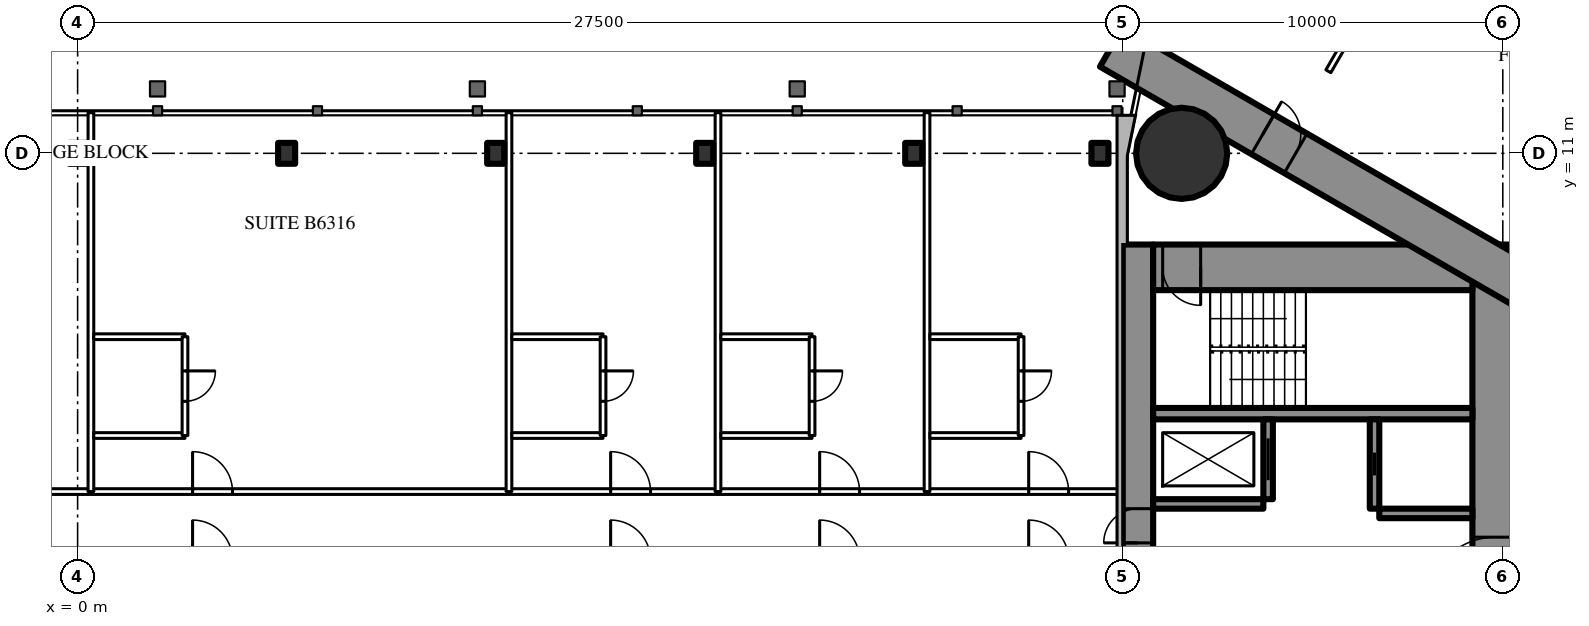
"""IFC4 building model, lengths in metres.
Left out: names, types, materials, properties, quantities, classifications, styles, units other than length and angle.
Written with IfcOpenShell. Run it as: python <this file> out.ifc"""

import sys

from ifc_helpers import new_model, si_unit, direction, frame, frame_2d, origin, origin_2d, place, context, subcontext, project, spatial, rectangle, circle, i_section, extrude, element, fill, save


model = new_model("IFC4")
c1 = context("Model", 3, precision=1e-05, world=origin(), true_north=direction((0.0, 1.0)))
c2 = subcontext(c1, "Body", "Model", "MODEL_VIEW")
j1 = project(units=[si_unit("LENGTHUNIT", "METRE"), si_unit("PLANEANGLEUNIT", "RADIAN")], contexts=[c1])
p1 = place(None, origin())
s1 = spatial("IfcSite", under=j1, at=p1, CompositionType="ELEMENT")
p2 = place(p1, origin())
s2 = spatial("IfcBuilding", under=s1, at=p2, CompositionType="ELEMENT")
p3 = place(p2, frame((0.0, 0.0, 236.9)))
s3 = spatial("IfcBuildingStorey", under=s2, at=p3, CompositionType="ELEMENT", Elevation=236.9)
p4 = place(p3, frame((29.05, 11.0, 0.0), z_axis=(0.0, 0.0, 1.0), x_axis=(1.0, 0.0, 0.0)))
e1 = element("IfcColumn", 1, at=p4, inside=s3, PredefinedType="COLUMN", context=c2, shape_type="SweptSolid", body=[
    extrude(circle(Radius=1.2, at=origin_2d()), origin(), (0.0, 0.0, 1.0), 3.6),
])
p5 = place(p3, frame((27.9, -8.6, 0.0), z_axis=(0.0, 0.0, 1.0), x_axis=(0.0, 1.0, 0.0)))
e2 = element("IfcWall", 2, at=p5, inside=s3, PredefinedType="SHEAR", context=c2, shape_type="SweptSolid", body=[
    extrude(rectangle(XDim=17.2, YDim=0.8, at=frame_2d((8.6, 0.0))), origin(), (0.0, 0.0, 1.0), 3.6),
])
p6 = place(p5, frame((9.35, 0.0, 0.0)))
e3 = element("IfcOpeningElement", 3, at=p6, cuts=e2, PredefinedType="OPENING", context=c2, shape_type="SweptSolid", body=[
    extrude(rectangle(XDim=0.9, YDim=2.2, at=frame_2d((0.45, 1.1))), frame((0.0, 0.41, 0.0), z_axis=(0.0, -1.0, 0.0), x_axis=(1.0, 0.0, 0.0)), (0.0, 0.0, 1.0), 0.82),
])
p7 = place(p3, frame((37.3, -8.6, 0.0), z_axis=(0.0, 0.0, 1.0), x_axis=(0.0, 1.0, 0.0)))
e4 = element("IfcWall", 4, at=p7, inside=s3, PredefinedType="SHEAR", context=c2, shape_type="SweptSolid", body=[
    extrude(rectangle(XDim=17.2, YDim=1.2, at=frame_2d((8.6, 0.0))), origin(), (0.0, 0.0, 1.0), 3.6),
])
p8 = place(p7, frame((7.7, 0.0, 0.0)))
e5 = element("IfcOpeningElement", 5, at=p8, cuts=e4, PredefinedType="OPENING", context=c2, shape_type="SweptSolid", body=[
    extrude(rectangle(XDim=1.8, YDim=2.2, at=frame_2d((0.9, 1.1))), frame((0.0, 0.61, 0.0), z_axis=(0.0, -1.0, 0.0), x_axis=(1.0, 0.0, 0.0)), (0.0, 0.0, 1.0), 1.22),
])
p9 = place(p3, frame((28.3, 8.0, 0.0), z_axis=(0.0, 0.0, 1.0), x_axis=(1.0, 0.0, 0.0)))
e6 = element("IfcWall", 6, at=p9, inside=s3, PredefinedType="SHEAR", context=c2, shape_type="SweptSolid", body=[
    extrude(rectangle(XDim=8.4, YDim=1.2, at=frame_2d((4.2, 0.0))), origin(), (0.0, 0.0, 1.0), 3.6),
])
p10 = place(p9, frame((0.25, 0.0, 0.0)))
e7 = element("IfcOpeningElement", 7, at=p10, cuts=e6, PredefinedType="OPENING", context=c2, shape_type="SweptSolid", body=[
    extrude(rectangle(XDim=1.0, YDim=2.2, at=frame_2d((0.5, 1.1))), frame((0.0, 0.61, 0.0), z_axis=(0.0, -1.0, 0.0), x_axis=(1.0, 0.0, 0.0)), (0.0, 0.0, 1.0), 1.22),
])
p11 = place(p3, frame((28.3, 4.15, 0.0), z_axis=(0.0, 0.0, 1.0), x_axis=(1.0, 0.0, 0.0)))
e8 = element("IfcWall", 8, at=p11, inside=s3, PredefinedType="SHEAR", context=c2, shape_type="SweptSolid", body=[
    extrude(rectangle(XDim=8.4, YDim=0.3, at=frame_2d((4.2, 0.0))), origin(), (0.0, 0.0, 1.0), 3.6),
])
p12 = place(p3, frame((31.325, 1.9, 0.0), z_axis=(0.0, 0.0, 1.0), x_axis=(0.0, 1.0, 0.0)))
e9 = element("IfcWall", 9, at=p12, inside=s3, PredefinedType="SHEAR", context=c2, shape_type="SweptSolid", body=[
    extrude(rectangle(XDim=2.1, YDim=0.25, at=frame_2d((1.05, 0.0))), origin(), (0.0, 0.0, 1.0), 3.6),
])
p13 = place(p12, frame((0.5, 0.0, 0.0)))
e10 = element("IfcOpeningElement", 10, at=p13, cuts=e9, PredefinedType="OPENING", context=c2, shape_type="SweptSolid", body=[
    extrude(rectangle(XDim=1.1, YDim=2.2, at=frame_2d((0.55, 1.1))), frame((0.0, 0.135, 0.0), z_axis=(0.0, -1.0, 0.0), x_axis=(1.0, 0.0, 0.0)), (0.0, 0.0, 1.0), 0.27),
])
p14 = place(p3, frame((34.125, 1.65, 0.0), z_axis=(0.0, 0.0, 1.0), x_axis=(0.0, 1.0, 0.0)))
e11 = element("IfcWall", 11, at=p14, inside=s3, PredefinedType="SHEAR", context=c2, shape_type="SweptSolid", body=[
    extrude(rectangle(XDim=2.35, YDim=0.25, at=frame_2d((1.175, 0.0))), origin(), (0.0, 0.0, 1.0), 3.6),
])
p15 = place(p14, frame((0.875, 0.0, 0.0)))
e12 = element("IfcOpeningElement", 12, at=p15, cuts=e11, PredefinedType="OPENING", context=c2, shape_type="SweptSolid", body=[
    extrude(rectangle(XDim=0.6, YDim=2.0, at=frame_2d((0.3, 1.0))), frame((0.0, 0.135, 0.0), z_axis=(0.0, -1.0, 0.0), x_axis=(1.0, 0.0, 0.0)), (0.0, 0.0, 1.0), 0.27),
])
p16 = place(p3, frame((28.3, 1.775, 0.0), z_axis=(0.0, 0.0, 1.0), x_axis=(1.0, 0.0, 0.0)))
e13 = element("IfcWall", 13, at=p16, inside=s3, PredefinedType="SHEAR", context=c2, shape_type="SweptSolid", body=[
    extrude(rectangle(XDim=2.9, YDim=0.25, at=frame_2d((1.45, 0.0))), origin(), (0.0, 0.0, 1.0), 3.6),
])
p17 = place(p3, frame((34.25, 1.525, 0.0), z_axis=(0.0, 0.0, 1.0), x_axis=(1.0, 0.0, 0.0)))
e14 = element("IfcWall", 14, at=p17, inside=s3, PredefinedType="SHEAR", context=c2, shape_type="SweptSolid", body=[
    extrude(rectangle(XDim=2.45, YDim=0.25, at=frame_2d((1.225, 0.0))), origin(), (0.0, 0.0, 1.0), 3.6),
])
p18 = place(p3, frame((27.2, -13.8, 0.0), z_axis=(0.0, 0.0, 1.0), x_axis=(0.866027159892, 0.499996958321, 0.0)))
e15 = element("IfcWall", 15, at=p18, inside=s3, PredefinedType="SHEAR", context=c2, shape_type="SweptSolid", body=[
    extrude(rectangle(XDim=27.947, YDim=1.2, at=frame_2d((13.973, 0.0))), origin(), (0.0, 0.0, 1.0), 3.6),
])
p19 = place(p18, frame((4.6, 0.0, 0.0)))
e16 = element("IfcOpeningElement", 16, at=p19, cuts=e15, PredefinedType="OPENING", context=c2, shape_type="SweptSolid", body=[
    extrude(rectangle(XDim=1.0, YDim=2.2, at=frame_2d((0.5, 1.1))), frame((0.0, 0.61, 0.0), z_axis=(0.0, -1.0, 0.0), x_axis=(1.0, 0.0, 0.0)), (0.0, 0.0, 1.0), 1.22),
])
p20 = place(p18, frame((13.395, 0.0, 0.0)))
e17 = element("IfcOpeningElement", 17, at=p20, cuts=e15, PredefinedType="OPENING", context=c2, shape_type="SweptSolid", body=[
    extrude(rectangle(XDim=1.8, YDim=2.2, at=frame_2d((0.9, 1.1))), frame((0.0, 0.61, 0.0), z_axis=(0.0, -1.0, 0.0), x_axis=(1.0, 0.0, 0.0)), (0.0, 0.0, 1.0), 1.22),
])
p21 = place(p3, frame((27.2, 13.8, 0.0), z_axis=(0.0, 0.0, 1.0), x_axis=(0.866024515034, -0.500001539357, 0.0)))
e18 = element("IfcWall", 18, at=p21, inside=s3, PredefinedType="SHEAR", context=c2, shape_type="SweptSolid", body=[
    extrude(rectangle(XDim=26.907, YDim=1.2, at=frame_2d((13.454, 0.0))), origin(), (0.0, 0.0, 1.0), 3.6),
])
p22 = place(p21, frame((4.6, 0.0, 0.0)))
e19 = element("IfcOpeningElement", 19, at=p22, cuts=e18, PredefinedType="OPENING", context=c2, shape_type="SweptSolid", body=[
    extrude(rectangle(XDim=1.0, YDim=2.2, at=frame_2d((0.5, 1.1))), frame((0.0, 0.61, 0.0), z_axis=(0.0, -1.0, 0.0), x_axis=(1.0, 0.0, 0.0)), (0.0, 0.0, 1.0), 1.22),
])
p23 = place(p21, frame((13.395, 0.0, 0.0)))
e20 = element("IfcOpeningElement", 20, at=p23, cuts=e18, PredefinedType="OPENING", context=c2, shape_type="SweptSolid", body=[
    extrude(rectangle(XDim=1.8, YDim=2.2, at=frame_2d((0.9, 1.1))), frame((0.0, 0.61, 0.0), z_axis=(0.0, -1.0, 0.0), x_axis=(1.0, 0.0, 0.0)), (0.0, 0.0, 1.0), 1.22),
])
for number, where, z_axis, x_axis in (
    (21, (0.0, 11.0, 0.0), (0.0, 0.0, 1.0), (1.0, 0.0, 0.0)),
    (22, (5.5, 11.0, 0.0), (0.0, 0.0, 1.0), (1.0, 0.0, 0.0)),
    (23, (11.0, 11.0, 0.0), (0.0, 0.0, 1.0), (1.0, 0.0, 0.0)),
    (24, (16.5, 11.0, 0.0), (0.0, 0.0, 1.0), (1.0, 0.0, 0.0)),
    (25, (22.0, 11.0, 0.0), (0.0, 0.0, 1.0), (1.0, 0.0, 0.0)),
    (26, (26.9, 11.0, 0.0), (0.0, 0.0, 1.0), (1.0, 0.0, 0.0)),
):
    element("IfcColumn", number, at=place(p3, frame(where, z_axis=z_axis, x_axis=x_axis)), inside=s3, PredefinedType="COLUMN", context=c2, shape_type="SweptSolid", body=[
        extrude(i_section(OverallWidth=0.448, OverallDepth=0.55, WebThickness=0.072, FlangeThickness=0.115, FilletRadius=0.02, at=origin_2d()), origin(), (0.0, 0.0, 1.0), 3.6),
    ])
p24 = place(p3, frame((32.91, 13.159, 0.0), z_axis=(0.0, 0.0, 1.0), x_axis=(0.500014963534, 0.866016764412, 0.0)))
e27 = element("IfcWall", 27, at=p24, inside=s3, PredefinedType="PARTITIONING", context=c2, shape_type="SweptSolid", body=[
    extrude(rectangle(XDim=7.682, YDim=0.15, at=frame_2d((3.841, 0.0))), origin(), (0.0, 0.0, 1.0), 3.35),
])
p25 = place(p3, frame((-10.65, 2.1, 0.0), z_axis=(0.0, 0.0, 1.0), x_axis=(1.0, 0.0, 0.0)))
e28 = element("IfcWall", 28, at=p25, inside=s3, PredefinedType="PARTITIONING", context=c2, shape_type="SweptSolid", body=[
    extrude(rectangle(XDim=38.15, YDim=0.15, at=frame_2d((19.075, 0.0))), origin(), (0.0, 0.0, 1.0), 3.4),
])
p26 = place(p25, frame((2.675, 0.0, 0.0)))
e29 = element("IfcOpeningElement", 29, at=p26, cuts=e28, PredefinedType="OPENING", context=c2, shape_type="SweptSolid", body=[
    extrude(rectangle(XDim=1.05, YDim=2.4, at=frame_2d((0.525, 1.2))), frame((0.0, 0.085, 0.0), z_axis=(0.0, -1.0, 0.0), x_axis=(1.0, 0.0, 0.0)), (0.0, 0.0, 1.0), 0.17),
])
p27 = place(p25, frame((13.675, 0.0, 0.0)))
e30 = element("IfcOpeningElement", 30, at=p27, cuts=e28, PredefinedType="OPENING", context=c2, shape_type="SweptSolid", body=[
    extrude(rectangle(XDim=1.05, YDim=2.4, at=frame_2d((0.525, 1.2))), frame((0.0, 0.085, 0.0), z_axis=(0.0, -1.0, 0.0), x_axis=(1.0, 0.0, 0.0)), (0.0, 0.0, 1.0), 0.17),
])
p28 = place(p25, frame((24.675, 0.0, 0.0)))
e31 = element("IfcOpeningElement", 31, at=p28, cuts=e28, PredefinedType="OPENING", context=c2, shape_type="SweptSolid", body=[
    extrude(rectangle(XDim=1.05, YDim=2.4, at=frame_2d((0.525, 1.2))), frame((0.0, 0.085, 0.0), z_axis=(0.0, -1.0, 0.0), x_axis=(1.0, 0.0, 0.0)), (0.0, 0.0, 1.0), 0.17),
])
p29 = place(p25, frame((30.175, 0.0, 0.0)))
e32 = element("IfcOpeningElement", 32, at=p29, cuts=e28, PredefinedType="OPENING", context=c2, shape_type="SweptSolid", body=[
    extrude(rectangle(XDim=1.05, YDim=2.4, at=frame_2d((0.525, 1.2))), frame((0.0, 0.085, 0.0), z_axis=(0.0, -1.0, 0.0), x_axis=(1.0, 0.0, 0.0)), (0.0, 0.0, 1.0), 0.17),
])
p30 = place(p25, frame((35.675, 0.0, 0.0)))
e33 = element("IfcOpeningElement", 33, at=p30, cuts=e28, PredefinedType="OPENING", context=c2, shape_type="SweptSolid", body=[
    extrude(rectangle(XDim=1.05, YDim=2.4, at=frame_2d((0.525, 1.2))), frame((0.0, 0.085, 0.0), z_axis=(0.0, -1.0, 0.0), x_axis=(1.0, 0.0, 0.0)), (0.0, 0.0, 1.0), 0.17),
])
for number, where, z_axis, x_axis in (
    (34, (0.35, 2.1, 0.0), (0.0, 0.0, 1.0), (0.0, 1.0, 0.0)),
    (35, (11.35, 2.1, 0.0), (0.0, 0.0, 1.0), (0.0, 1.0, 0.0)),
    (36, (16.85, 2.1, 0.0), (0.0, 0.0, 1.0), (0.0, 1.0, 0.0)),
    (37, (22.35, 2.1, 0.0), (0.0, 0.0, 1.0), (0.0, 1.0, 0.0)),
):
    element("IfcWall", number, at=place(p3, frame(where, z_axis=z_axis, x_axis=x_axis)), inside=s3, PredefinedType="PARTITIONING", context=c2, shape_type="SweptSolid", body=[
        extrude(rectangle(XDim=9.97, YDim=0.15, at=frame_2d((4.985, 0.0))), origin(), (0.0, 0.0, 1.0), 3.4),
    ])
for number, where, z_axis, x_axis in (
    (38, (0.425, 6.175, 0.0), (0.0, 0.0, 1.0), (1.0, 0.0, 0.0)),
    (39, (0.425, 3.575, 0.0), (0.0, 0.0, 1.0), (1.0, 0.0, 0.0)),
):
    element("IfcWall", number, at=place(p3, frame(where, z_axis=z_axis, x_axis=x_axis)), inside=s3, PredefinedType="PARTITIONING", context=c2, shape_type="SweptSolid", body=[
        extrude(rectangle(XDim=2.4, YDim=0.15, at=frame_2d((1.2, 0.0))), origin(), (0.0, 0.0, 1.0), 3.4),
    ])
p31 = place(p3, frame((2.825, 3.575, 0.0), z_axis=(0.0, 0.0, 1.0), x_axis=(0.0, 1.0, 0.0)))
e40 = element("IfcWall", 40, at=p31, inside=s3, PredefinedType="PARTITIONING", context=c2, shape_type="SweptSolid", body=[
    extrude(rectangle(XDim=2.6, YDim=0.15, at=frame_2d((1.3, 0.0))), origin(), (0.0, 0.0, 1.0), 3.4),
])
p32 = place(p31, frame((0.9, 0.0, 0.0)))
e41 = element("IfcOpeningElement", 41, at=p32, cuts=e40, PredefinedType="OPENING", context=c2, shape_type="SweptSolid", body=[
    extrude(rectangle(XDim=0.8, YDim=2.2, at=frame_2d((0.4, 1.1))), frame((0.0, 0.085, 0.0), z_axis=(0.0, -1.0, 0.0), x_axis=(1.0, 0.0, 0.0)), (0.0, 0.0, 1.0), 0.17),
])
for number, where, z_axis, x_axis in (
    (42, (11.425, 6.175, 0.0), (0.0, 0.0, 1.0), (1.0, 0.0, 0.0)),
    (43, (11.425, 3.575, 0.0), (0.0, 0.0, 1.0), (1.0, 0.0, 0.0)),
):
    element("IfcWall", number, at=place(p3, frame(where, z_axis=z_axis, x_axis=x_axis)), inside=s3, PredefinedType="PARTITIONING", context=c2, shape_type="SweptSolid", body=[
        extrude(rectangle(XDim=2.4, YDim=0.15, at=frame_2d((1.2, 0.0))), origin(), (0.0, 0.0, 1.0), 3.4),
    ])
p33 = place(p3, frame((13.825, 3.575, 0.0), z_axis=(0.0, 0.0, 1.0), x_axis=(0.0, 1.0, 0.0)))
e44 = element("IfcWall", 44, at=p33, inside=s3, PredefinedType="PARTITIONING", context=c2, shape_type="SweptSolid", body=[
    extrude(rectangle(XDim=2.6, YDim=0.15, at=frame_2d((1.3, 0.0))), origin(), (0.0, 0.0, 1.0), 3.4),
])
p34 = place(p33, frame((0.9, 0.0, 0.0)))
e45 = element("IfcOpeningElement", 45, at=p34, cuts=e44, PredefinedType="OPENING", context=c2, shape_type="SweptSolid", body=[
    extrude(rectangle(XDim=0.8, YDim=2.2, at=frame_2d((0.4, 1.1))), frame((0.0, 0.085, 0.0), z_axis=(0.0, -1.0, 0.0), x_axis=(1.0, 0.0, 0.0)), (0.0, 0.0, 1.0), 0.17),
])
for number, where, z_axis, x_axis in (
    (46, (16.925, 6.175, 0.0), (0.0, 0.0, 1.0), (1.0, 0.0, 0.0)),
    (47, (16.925, 3.575, 0.0), (0.0, 0.0, 1.0), (1.0, 0.0, 0.0)),
):
    element("IfcWall", number, at=place(p3, frame(where, z_axis=z_axis, x_axis=x_axis)), inside=s3, PredefinedType="PARTITIONING", context=c2, shape_type="SweptSolid", body=[
        extrude(rectangle(XDim=2.4, YDim=0.15, at=frame_2d((1.2, 0.0))), origin(), (0.0, 0.0, 1.0), 3.4),
    ])
p35 = place(p3, frame((19.325, 3.575, 0.0), z_axis=(0.0, 0.0, 1.0), x_axis=(0.0, 1.0, 0.0)))
e48 = element("IfcWall", 48, at=p35, inside=s3, PredefinedType="PARTITIONING", context=c2, shape_type="SweptSolid", body=[
    extrude(rectangle(XDim=2.6, YDim=0.15, at=frame_2d((1.3, 0.0))), origin(), (0.0, 0.0, 1.0), 3.4),
])
p36 = place(p35, frame((0.9, 0.0, 0.0)))
e49 = element("IfcOpeningElement", 49, at=p36, cuts=e48, PredefinedType="OPENING", context=c2, shape_type="SweptSolid", body=[
    extrude(rectangle(XDim=0.8, YDim=2.2, at=frame_2d((0.4, 1.1))), frame((0.0, 0.085, 0.0), z_axis=(0.0, -1.0, 0.0), x_axis=(1.0, 0.0, 0.0)), (0.0, 0.0, 1.0), 0.17),
])
for number, where, z_axis, x_axis in (
    (50, (22.425, 6.175, 0.0), (0.0, 0.0, 1.0), (1.0, 0.0, 0.0)),
    (51, (22.425, 3.575, 0.0), (0.0, 0.0, 1.0), (1.0, 0.0, 0.0)),
):
    element("IfcWall", number, at=place(p3, frame(where, z_axis=z_axis, x_axis=x_axis)), inside=s3, PredefinedType="PARTITIONING", context=c2, shape_type="SweptSolid", body=[
        extrude(rectangle(XDim=2.4, YDim=0.15, at=frame_2d((1.2, 0.0))), origin(), (0.0, 0.0, 1.0), 3.4),
    ])
p37 = place(p3, frame((24.825, 3.575, 0.0), z_axis=(0.0, 0.0, 1.0), x_axis=(0.0, 1.0, 0.0)))
e52 = element("IfcWall", 52, at=p37, inside=s3, PredefinedType="PARTITIONING", context=c2, shape_type="SweptSolid", body=[
    extrude(rectangle(XDim=2.6, YDim=0.15, at=frame_2d((1.3, 0.0))), origin(), (0.0, 0.0, 1.0), 3.4),
])
p38 = place(p37, frame((0.9, 0.0, 0.0)))
e53 = element("IfcOpeningElement", 53, at=p38, cuts=e52, PredefinedType="OPENING", context=c2, shape_type="SweptSolid", body=[
    extrude(rectangle(XDim=0.8, YDim=2.2, at=frame_2d((0.4, 1.1))), frame((0.0, 0.085, 0.0), z_axis=(0.0, -1.0, 0.0), x_axis=(1.0, 0.0, 0.0)), (0.0, 0.0, 1.0), 0.17),
])
p39 = place(p22, origin())
e54 = element("IfcDoor", 54, at=p39, inside=s3, OperationType="SINGLE_SWING_LEFT", PredefinedType="DOOR", context=c2, shape_type="SweptSolid", body=[
    extrude(rectangle(XDim=1.0, YDim=2.2, at=frame_2d((0.5, 1.1))), frame((0.0, 0.025, 0.0), z_axis=(0.0, -1.0, 0.0), x_axis=(1.0, 0.0, 0.0)), (0.0, 0.0, 1.0), 0.05),
])
fill(e19, e54)
p40 = place(p8, origin())
e55 = element("IfcDoor", 55, at=p40, inside=s3, OperationType="DOUBLE_DOOR_SINGLE_SWING", PredefinedType="DOOR", context=c2, shape_type="SweptSolid", body=[
    extrude(rectangle(XDim=1.8, YDim=2.2, at=frame_2d((0.9, 1.1))), frame((0.0, 0.025, 0.0), z_axis=(0.0, -1.0, 0.0), x_axis=(1.0, 0.0, 0.0)), (0.0, 0.0, 1.0), 0.05),
])
fill(e5, e55)
p41 = place(p10, origin())
e56 = element("IfcDoor", 56, at=p41, inside=s3, OperationType="SINGLE_SWING_RIGHT", PredefinedType="DOOR", context=c2, shape_type="SweptSolid", body=[
    extrude(rectangle(XDim=1.0, YDim=2.2, at=frame_2d((0.5, 1.1))), frame((0.0, 0.025, 0.0), z_axis=(0.0, -1.0, 0.0), x_axis=(1.0, 0.0, 0.0)), (0.0, 0.0, 1.0), 0.05),
])
fill(e7, e56)
p42 = place(p6, origin())
e57 = element("IfcDoor", 57, at=p42, inside=s3, OperationType="SINGLE_SWING_LEFT", PredefinedType="DOOR", context=c2, shape_type="SweptSolid", body=[
    extrude(rectangle(XDim=0.9, YDim=2.2, at=frame_2d((0.45, 1.1))), frame((0.0, 0.025, 0.0), z_axis=(0.0, -1.0, 0.0), x_axis=(1.0, 0.0, 0.0)), (0.0, 0.0, 1.0), 0.05),
])
fill(e3, e57)
p43 = place(p32, origin())
e58 = element("IfcDoor", 58, at=p43, inside=s3, OperationType="SINGLE_SWING_RIGHT", PredefinedType="DOOR", context=c2, shape_type="SweptSolid", body=[
    extrude(rectangle(XDim=0.8, YDim=2.2, at=frame_2d((0.4, 1.1))), frame((0.0, 0.025, 0.0), z_axis=(0.0, -1.0, 0.0), x_axis=(1.0, 0.0, 0.0)), (0.0, 0.0, 1.0), 0.05),
])
fill(e41, e58)
p44 = place(p27, origin())
e59 = element("IfcDoor", 59, at=p44, inside=s3, OperationType="SINGLE_SWING_LEFT", PredefinedType="DOOR", context=c2, shape_type="SweptSolid", body=[
    extrude(rectangle(XDim=1.05, YDim=2.4, at=frame_2d((0.525, 1.2))), frame((0.0, 0.025, 0.0), z_axis=(0.0, -1.0, 0.0), x_axis=(1.0, 0.0, 0.0)), (0.0, 0.0, 1.0), 0.05),
])
fill(e30, e59)
p45 = place(p34, origin())
e60 = element("IfcDoor", 60, at=p45, inside=s3, OperationType="SINGLE_SWING_RIGHT", PredefinedType="DOOR", context=c2, shape_type="SweptSolid", body=[
    extrude(rectangle(XDim=0.8, YDim=2.2, at=frame_2d((0.4, 1.1))), frame((0.0, 0.025, 0.0), z_axis=(0.0, -1.0, 0.0), x_axis=(1.0, 0.0, 0.0)), (0.0, 0.0, 1.0), 0.05),
])
fill(e45, e60)
p46 = place(p28, origin())
e61 = element("IfcDoor", 61, at=p46, inside=s3, OperationType="SINGLE_SWING_LEFT", PredefinedType="DOOR", context=c2, shape_type="SweptSolid", body=[
    extrude(rectangle(XDim=1.05, YDim=2.4, at=frame_2d((0.525, 1.2))), frame((0.0, 0.025, 0.0), z_axis=(0.0, -1.0, 0.0), x_axis=(1.0, 0.0, 0.0)), (0.0, 0.0, 1.0), 0.05),
])
fill(e31, e61)
p47 = place(p36, origin())
e62 = element("IfcDoor", 62, at=p47, inside=s3, OperationType="SINGLE_SWING_RIGHT", PredefinedType="DOOR", context=c2, shape_type="SweptSolid", body=[
    extrude(rectangle(XDim=0.8, YDim=2.2, at=frame_2d((0.4, 1.1))), frame((0.0, 0.025, 0.0), z_axis=(0.0, -1.0, 0.0), x_axis=(1.0, 0.0, 0.0)), (0.0, 0.0, 1.0), 0.05),
])
fill(e49, e62)
p48 = place(p29, origin())
e63 = element("IfcDoor", 63, at=p48, inside=s3, OperationType="SINGLE_SWING_LEFT", PredefinedType="DOOR", context=c2, shape_type="SweptSolid", body=[
    extrude(rectangle(XDim=1.05, YDim=2.4, at=frame_2d((0.525, 1.2))), frame((0.0, 0.025, 0.0), z_axis=(0.0, -1.0, 0.0), x_axis=(1.0, 0.0, 0.0)), (0.0, 0.0, 1.0), 0.05),
])
fill(e32, e63)
p49 = place(p38, origin())
e64 = element("IfcDoor", 64, at=p49, inside=s3, OperationType="SINGLE_SWING_RIGHT", PredefinedType="DOOR", context=c2, shape_type="SweptSolid", body=[
    extrude(rectangle(XDim=0.8, YDim=2.2, at=frame_2d((0.4, 1.1))), frame((0.0, 0.025, 0.0), z_axis=(0.0, -1.0, 0.0), x_axis=(1.0, 0.0, 0.0)), (0.0, 0.0, 1.0), 0.05),
])
fill(e53, e64)
p50 = place(p30, origin())
e65 = element("IfcDoor", 65, at=p50, inside=s3, OperationType="SINGLE_SWING_LEFT", PredefinedType="DOOR", context=c2, shape_type="SweptSolid", body=[
    extrude(rectangle(XDim=1.05, YDim=2.4, at=frame_2d((0.525, 1.2))), frame((0.0, 0.025, 0.0), z_axis=(0.0, -1.0, 0.0), x_axis=(1.0, 0.0, 0.0)), (0.0, 0.0, 1.0), 0.05),
])
fill(e33, e65)
p51 = place(p13, origin())
e66 = element("IfcDoor", 66, at=p51, inside=s3, OperationType="SLIDING_TO_LEFT", PredefinedType="USERDEFINED", context=c2, shape_type="SweptSolid", body=[
    extrude(rectangle(XDim=1.1, YDim=2.2, at=frame_2d((0.55, 1.1))), frame((0.0, 0.025, 0.0), z_axis=(0.0, -1.0, 0.0), x_axis=(1.0, 0.0, 0.0)), (0.0, 0.0, 1.0), 0.05),
])
fill(e10, e66)
p52 = place(p15, origin())
e67 = element("IfcDoor", 67, at=p52, inside=s3, OperationType="SLIDING_TO_LEFT", PredefinedType="DOOR", context=c2, shape_type="SweptSolid", body=[
    extrude(rectangle(XDim=0.6, YDim=2.0, at=frame_2d((0.3, 1.0))), frame((0.0, 0.025, 0.0), z_axis=(0.0, -1.0, 0.0), x_axis=(1.0, 0.0, 0.0)), (0.0, 0.0, 1.0), 0.05),
])
fill(e12, e67)
save(model, sys.argv[1])
